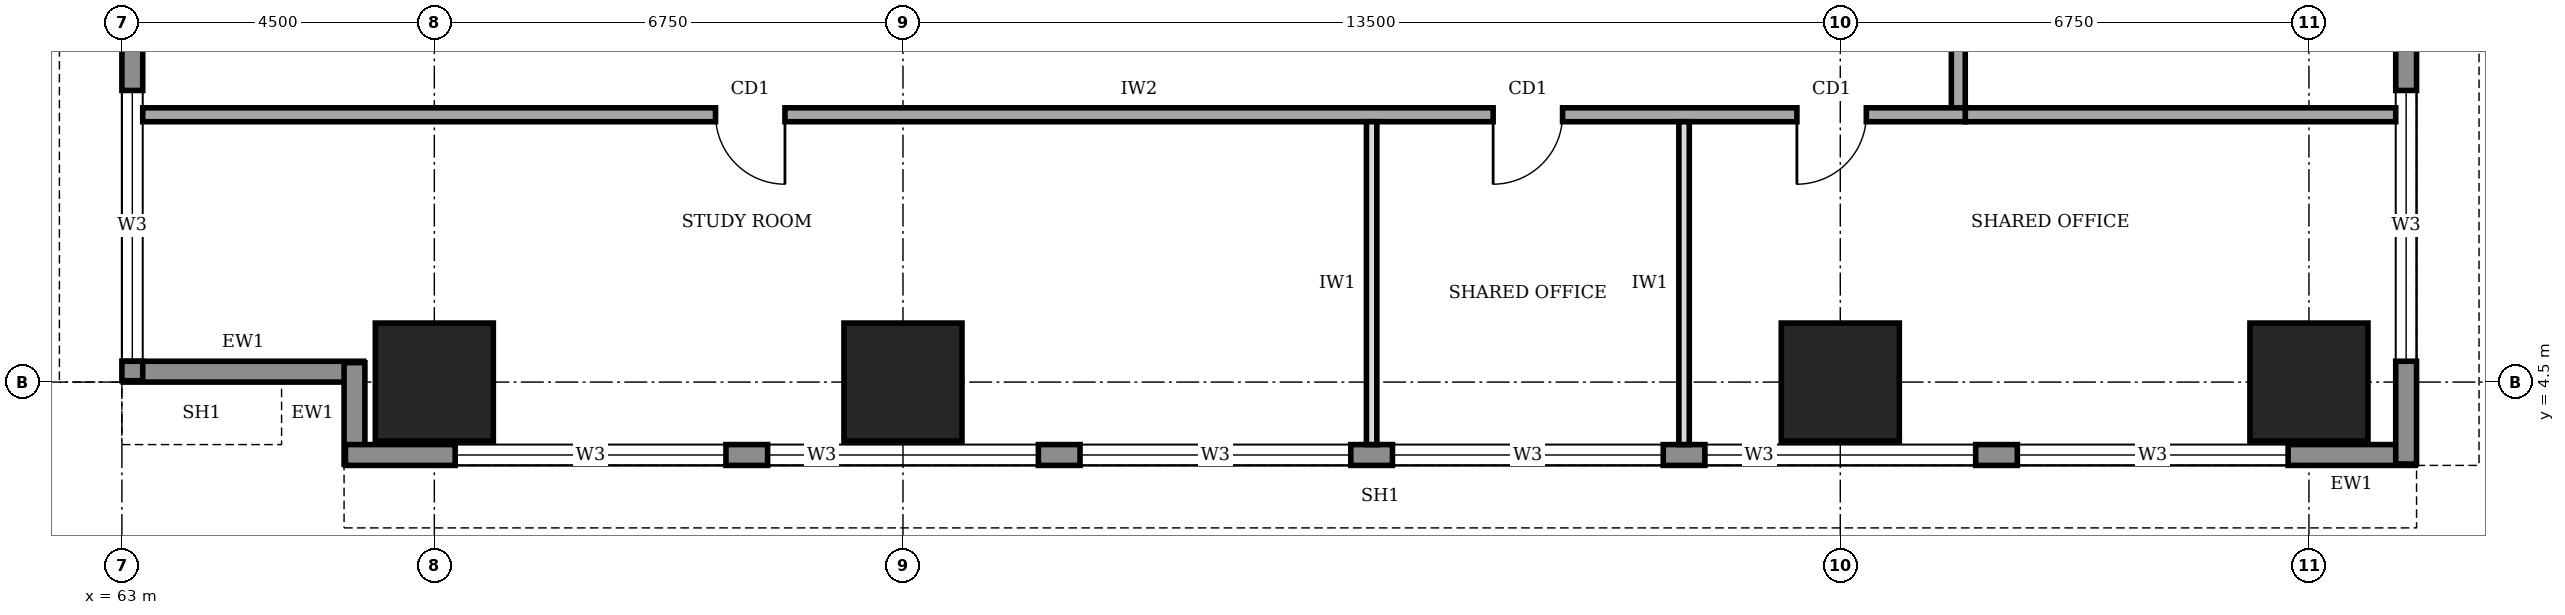
"""IFC4 building model, lengths in metres.
Left out: names, types, materials, properties, quantities, classifications, styles, units other than length and angle.
Written with IfcOpenShell. Run it as: python <this file> out.ifc"""

import sys

from ifc_helpers import new_model, si_unit, direction, frame, frame_2d, origin, origin_2d, place, context, subcontext, project, spatial, rectangle, extrude, element, fill, save


model = new_model("IFC4")
c1 = context("Model", 3, precision=1e-05, world=origin(), true_north=direction((0.0, 1.0)))
c2 = subcontext(c1, "Body", "Model", "MODEL_VIEW")
j1 = project(units=[si_unit("LENGTHUNIT", "METRE"), si_unit("PLANEANGLEUNIT", "RADIAN")], contexts=[c1])
p1 = place(None, origin())
s1 = spatial("IfcSite", under=j1, at=p1, CompositionType="ELEMENT")
p2 = place(p1, origin())
s2 = spatial("IfcBuilding", under=s1, at=p2, CompositionType="ELEMENT")
p3 = place(p2, frame((0.0, 0.0, 97.0)))
s3 = spatial("IfcBuildingStorey", under=s2, at=p3, CompositionType="ELEMENT", Elevation=97.0)
for number, where, z_axis, x_axis in (
    (1, (67.5, 4.5, 0.0), (0.0, 0.0, 1.0), (1.0, 0.0, 0.0)),
    (2, (74.25, 4.5, 0.0), (0.0, 0.0, 1.0), (1.0, 0.0, 0.0)),
    (3, (87.75, 4.5, 0.0), (0.0, 0.0, 1.0), (1.0, 0.0, 0.0)),
    (4, (94.5, 4.5, 0.0), (0.0, 0.0, 1.0), (1.0, 0.0, 0.0)),
):
    element("IfcColumn", number, at=place(p3, frame(where, z_axis=z_axis, x_axis=x_axis)), inside=s3, PredefinedType="COLUMN", context=c2, shape_type="SweptSolid", body=[
        extrude(rectangle(XDim=1.7, YDim=1.7, at=origin_2d()), origin(), (0.0, 0.0, 1.0), 4.0),
    ])
p4 = place(p3, frame((63.02, 4.65, 0.0), z_axis=(0.0, 0.0, 1.0), x_axis=(1.0, 0.0, 0.0)))
e5 = element("IfcWall", 5, at=p4, inside=s3, PredefinedType="STANDARD", context=c2, shape_type="SweptSolid", body=[
    extrude(rectangle(XDim=3.46, YDim=0.3, at=frame_2d((1.73, 0.0))), origin(), (0.0, 0.0, 1.0), 2.85),
])
p5 = place(p3, frame((66.35, 4.78, 0.0), z_axis=(0.0, 0.0, 1.0), x_axis=(0.0, -1.0, 0.0)))
e6 = element("IfcWall", 6, at=p5, inside=s3, PredefinedType="STANDARD", context=c2, shape_type="SweptSolid", body=[
    extrude(rectangle(XDim=1.46, YDim=0.3, at=frame_2d((0.73, 0.0))), origin(), (0.0, 0.0, 1.0), 3.75),
])
p6 = place(p3, frame((66.22, 3.45, 0.0), z_axis=(0.0, 0.0, 1.0), x_axis=(1.0, 0.0, 0.0)))
e7 = element("IfcWall", 7, at=p6, inside=s3, PredefinedType="STANDARD", context=c2, shape_type="SweptSolid", body=[
    extrude(rectangle(XDim=29.81, YDim=0.3, at=frame_2d((14.905, 0.0))), origin(), (0.0, 0.0, 1.0), 3.75),
])
p7 = place(p6, frame((1.58, 0.0, 0.95)))
e8 = element("IfcOpeningElement", 8, at=p7, cuts=e7, PredefinedType="OPENING", context=c2, shape_type="SweptSolid", body=[
    extrude(rectangle(XDim=3.9, YDim=1.8, at=frame_2d((1.95, 0.9))), frame((0.0, 0.16, 0.0), z_axis=(0.0, -1.0, 0.0), x_axis=(1.0, 0.0, 0.0)), (0.0, 0.0, 1.0), 0.32),
])
p8 = place(p6, frame((6.08, 0.0, 0.95)))
e9 = element("IfcOpeningElement", 9, at=p8, cuts=e7, PredefinedType="OPENING", context=c2, shape_type="SweptSolid", body=[
    extrude(rectangle(XDim=3.9, YDim=1.8, at=frame_2d((1.95, 0.9))), frame((0.0, 0.16, 0.0), z_axis=(0.0, -1.0, 0.0), x_axis=(1.0, 0.0, 0.0)), (0.0, 0.0, 1.0), 0.32),
])
p9 = place(p6, frame((10.58, 0.0, 0.95)))
e10 = element("IfcOpeningElement", 10, at=p9, cuts=e7, PredefinedType="OPENING", context=c2, shape_type="SweptSolid", body=[
    extrude(rectangle(XDim=3.9, YDim=1.8, at=frame_2d((1.95, 0.9))), frame((0.0, 0.16, 0.0), z_axis=(0.0, -1.0, 0.0), x_axis=(1.0, 0.0, 0.0)), (0.0, 0.0, 1.0), 0.32),
])
p10 = place(p6, frame((15.08, 0.0, 0.95)))
e11 = element("IfcOpeningElement", 11, at=p10, cuts=e7, PredefinedType="OPENING", context=c2, shape_type="SweptSolid", body=[
    extrude(rectangle(XDim=3.9, YDim=1.8, at=frame_2d((1.95, 0.9))), frame((0.0, 0.16, 0.0), z_axis=(0.0, -1.0, 0.0), x_axis=(1.0, 0.0, 0.0)), (0.0, 0.0, 1.0), 0.32),
])
p11 = place(p6, frame((19.58, 0.0, 0.95)))
e12 = element("IfcOpeningElement", 12, at=p11, cuts=e7, PredefinedType="OPENING", context=c2, shape_type="SweptSolid", body=[
    extrude(rectangle(XDim=3.9, YDim=1.8, at=frame_2d((1.95, 0.9))), frame((0.0, 0.16, 0.0), z_axis=(0.0, -1.0, 0.0), x_axis=(1.0, 0.0, 0.0)), (0.0, 0.0, 1.0), 0.32),
])
p12 = place(p6, frame((24.08, 0.0, 0.95)))
e13 = element("IfcOpeningElement", 13, at=p12, cuts=e7, PredefinedType="OPENING", context=c2, shape_type="SweptSolid", body=[
    extrude(rectangle(XDim=3.9, YDim=1.8, at=frame_2d((1.95, 0.9))), frame((0.0, 0.16, 0.0), z_axis=(0.0, -1.0, 0.0), x_axis=(1.0, 0.0, 0.0)), (0.0, 0.0, 1.0), 0.32),
])
p13 = place(p3, frame((95.9, 3.32, 0.0), z_axis=(0.0, 0.0, 1.0), x_axis=(0.0, 1.0, 0.0)))
e14 = element("IfcWall", 14, at=p13, inside=s3, PredefinedType="STANDARD", context=c2, shape_type="SweptSolid", body=[
    extrude(rectangle(XDim=33.96, YDim=0.3, at=frame_2d((16.98, 0.0))), origin(), (0.0, 0.0, 1.0), 3.75),
])
p14 = place(p13, frame((1.48, 0.0, 0.95)))
e15 = element("IfcOpeningElement", 15, at=p14, cuts=e14, PredefinedType="OPENING", context=c2, shape_type="SweptSolid", body=[
    extrude(rectangle(XDim=3.9, YDim=1.8, at=frame_2d((1.95, 0.9))), frame((0.0, 0.16, 0.0), z_axis=(0.0, -1.0, 0.0), x_axis=(1.0, 0.0, 0.0)), (0.0, 0.0, 1.0), 0.32),
])
p15 = place(p13, frame((5.98, 0.0, 0.95)))
e16 = element("IfcOpeningElement", 16, at=p15, cuts=e14, PredefinedType="OPENING", context=c2, shape_type="SweptSolid", body=[
    extrude(rectangle(XDim=3.9, YDim=1.8, at=frame_2d((1.95, 0.9))), frame((0.0, 0.16, 0.0), z_axis=(0.0, -1.0, 0.0), x_axis=(1.0, 0.0, 0.0)), (0.0, 0.0, 1.0), 0.32),
])
p16 = place(p13, frame((10.48, 0.0, 0.95)))
e17 = element("IfcOpeningElement", 17, at=p16, cuts=e14, PredefinedType="OPENING", context=c2, shape_type="SweptSolid", body=[
    extrude(rectangle(XDim=3.9, YDim=1.8, at=frame_2d((1.95, 0.9))), frame((0.0, 0.16, 0.0), z_axis=(0.0, -1.0, 0.0), x_axis=(1.0, 0.0, 0.0)), (0.0, 0.0, 1.0), 0.32),
])
p17 = place(p13, frame((14.98, 0.0, 0.95)))
e18 = element("IfcOpeningElement", 18, at=p17, cuts=e14, PredefinedType="OPENING", context=c2, shape_type="SweptSolid", body=[
    extrude(rectangle(XDim=3.9, YDim=1.8, at=frame_2d((1.95, 0.9))), frame((0.0, 0.16, 0.0), z_axis=(0.0, -1.0, 0.0), x_axis=(1.0, 0.0, 0.0)), (0.0, 0.0, 1.0), 0.32),
])
p18 = place(p13, frame((19.48, 0.0, 0.95)))
e19 = element("IfcOpeningElement", 19, at=p18, cuts=e14, PredefinedType="OPENING", context=c2, shape_type="SweptSolid", body=[
    extrude(rectangle(XDim=3.9, YDim=1.8, at=frame_2d((1.95, 0.9))), frame((0.0, 0.16, 0.0), z_axis=(0.0, -1.0, 0.0), x_axis=(1.0, 0.0, 0.0)), (0.0, 0.0, 1.0), 0.32),
])
p19 = place(p13, frame((23.98, 0.0, 0.95)))
e20 = element("IfcOpeningElement", 20, at=p19, cuts=e14, PredefinedType="OPENING", context=c2, shape_type="SweptSolid", body=[
    extrude(rectangle(XDim=3.9, YDim=1.8, at=frame_2d((1.95, 0.9))), frame((0.0, 0.16, 0.0), z_axis=(0.0, -1.0, 0.0), x_axis=(1.0, 0.0, 0.0)), (0.0, 0.0, 1.0), 0.32),
])
p20 = place(p13, frame((28.48, 0.0, 0.95)))
e21 = element("IfcOpeningElement", 21, at=p20, cuts=e14, PredefinedType="OPENING", context=c2, shape_type="SweptSolid", body=[
    extrude(rectangle(XDim=3.9, YDim=1.8, at=frame_2d((1.95, 0.9))), frame((0.0, 0.16, 0.0), z_axis=(0.0, -1.0, 0.0), x_axis=(1.0, 0.0, 0.0)), (0.0, 0.0, 1.0), 0.32),
])
p21 = place(p3, frame((63.15, 35.98, 0.0), z_axis=(0.0, 0.0, 1.0), x_axis=(0.0, -1.0, 0.0)))
e22 = element("IfcWall", 22, at=p21, inside=s3, PredefinedType="STANDARD", context=c2, shape_type="SweptSolid", body=[
    extrude(rectangle(XDim=31.46, YDim=0.3, at=frame_2d((15.73, 0.0))), origin(), (0.0, 0.0, 1.0), 3.75),
])
p22 = place(p21, frame((27.28, 0.0, 0.95)))
e23 = element("IfcOpeningElement", 23, at=p22, cuts=e22, PredefinedType="OPENING", context=c2, shape_type="SweptSolid", body=[
    extrude(rectangle(XDim=3.9, YDim=1.8, at=frame_2d((1.95, 0.9))), frame((0.0, 0.16, 0.0), z_axis=(0.0, -1.0, 0.0), x_axis=(1.0, 0.0, 0.0)), (0.0, 0.0, 1.0), 0.32),
])
p23 = place(p21, frame((22.78, 0.0, 0.95)))
e24 = element("IfcOpeningElement", 24, at=p23, cuts=e22, PredefinedType="OPENING", context=c2, shape_type="SweptSolid", body=[
    extrude(rectangle(XDim=3.9, YDim=1.8, at=frame_2d((1.95, 0.9))), frame((0.0, 0.16, 0.0), z_axis=(0.0, -1.0, 0.0), x_axis=(1.0, 0.0, 0.0)), (0.0, 0.0, 1.0), 0.32),
])
p24 = place(p21, frame((18.28, 0.0, 0.95)))
e25 = element("IfcOpeningElement", 25, at=p24, cuts=e22, PredefinedType="OPENING", context=c2, shape_type="SweptSolid", body=[
    extrude(rectangle(XDim=3.9, YDim=1.8, at=frame_2d((1.95, 0.9))), frame((0.0, 0.16, 0.0), z_axis=(0.0, -1.0, 0.0), x_axis=(1.0, 0.0, 0.0)), (0.0, 0.0, 1.0), 0.32),
])
p25 = place(p21, frame((13.78, 0.0, 0.95)))
e26 = element("IfcOpeningElement", 26, at=p25, cuts=e22, PredefinedType="OPENING", context=c2, shape_type="SweptSolid", body=[
    extrude(rectangle(XDim=3.9, YDim=1.8, at=frame_2d((1.95, 0.9))), frame((0.0, 0.16, 0.0), z_axis=(0.0, -1.0, 0.0), x_axis=(1.0, 0.0, 0.0)), (0.0, 0.0, 1.0), 0.32),
])
p26 = place(p21, frame((9.28, 0.0, 0.95)))
e27 = element("IfcOpeningElement", 27, at=p26, cuts=e22, PredefinedType="OPENING", context=c2, shape_type="SweptSolid", body=[
    extrude(rectangle(XDim=3.9, YDim=1.8, at=frame_2d((1.95, 0.9))), frame((0.0, 0.16, 0.0), z_axis=(0.0, -1.0, 0.0), x_axis=(1.0, 0.0, 0.0)), (0.0, 0.0, 1.0), 0.32),
])
p27 = place(p21, frame((4.78, 0.0, 0.95)))
e28 = element("IfcOpeningElement", 28, at=p27, cuts=e22, PredefinedType="OPENING", context=c2, shape_type="SweptSolid", body=[
    extrude(rectangle(XDim=3.9, YDim=1.8, at=frame_2d((1.95, 0.9))), frame((0.0, 0.16, 0.0), z_axis=(0.0, -1.0, 0.0), x_axis=(1.0, 0.0, 0.0)), (0.0, 0.0, 1.0), 0.32),
])
p28 = place(p3, frame((63.3, 8.35, 0.0), z_axis=(0.0, 0.0, 1.0), x_axis=(1.0, 0.0, 0.0)))
e29 = element("IfcWall", 29, at=p28, inside=s3, PredefinedType="SOLIDWALL", context=c2, shape_type="SweptSolid", body=[
    extrude(rectangle(XDim=26.25, YDim=0.2, at=frame_2d((13.125, 0.0))), origin(), (0.0, 0.0, 1.0), 3.75),
])
p29 = place(p28, frame((8.25, 0.0, 0.0)))
e30 = element("IfcOpeningElement", 30, at=p29, cuts=e29, PredefinedType="OPENING", context=c2, shape_type="SweptSolid", body=[
    extrude(rectangle(XDim=1.0, YDim=2.1, at=frame_2d((0.5, 1.05))), frame((0.0, 0.11, 0.0), z_axis=(0.0, -1.0, 0.0), x_axis=(1.0, 0.0, 0.0)), (0.0, 0.0, 1.0), 0.22),
])
p30 = place(p28, frame((19.45, 0.0, 0.0)))
e31 = element("IfcOpeningElement", 31, at=p30, cuts=e29, PredefinedType="OPENING", context=c2, shape_type="SweptSolid", body=[
    extrude(rectangle(XDim=1.0, YDim=2.1, at=frame_2d((0.5, 1.05))), frame((0.0, 0.11, 0.0), z_axis=(0.0, -1.0, 0.0), x_axis=(1.0, 0.0, 0.0)), (0.0, 0.0, 1.0), 0.22),
])
p31 = place(p28, frame((23.825, 0.0, 0.0)))
e32 = element("IfcOpeningElement", 32, at=p31, cuts=e29, PredefinedType="OPENING", context=c2, shape_type="SweptSolid", body=[
    extrude(rectangle(XDim=1.0, YDim=2.1, at=frame_2d((0.5, 1.05))), frame((0.0, 0.11, 0.0), z_axis=(0.0, -1.0, 0.0), x_axis=(1.0, 0.0, 0.0)), (0.0, 0.0, 1.0), 0.22),
])
p32 = place(p3, frame((89.45, 8.45, 0.0), z_axis=(0.0, 0.0, 1.0), x_axis=(0.0, 1.0, 0.0)))
e33 = element("IfcWall", 33, at=p32, inside=s3, PredefinedType="SOLIDWALL", context=c2, shape_type="SweptSolid", body=[
    extrude(rectangle(XDim=23.8, YDim=0.2, at=frame_2d((11.9, 0.0))), origin(), (0.0, 0.0, 1.0), 3.75),
])
p33 = place(p32, frame((1.925, 0.0, 0.0)))
e34 = element("IfcOpeningElement", 34, at=p33, cuts=e33, PredefinedType="OPENING", context=c2, shape_type="SweptSolid", body=[
    extrude(rectangle(XDim=1.0, YDim=2.1, at=frame_2d((0.5, 1.05))), frame((0.0, 0.11, 0.0), z_axis=(0.0, -1.0, 0.0), x_axis=(1.0, 0.0, 0.0)), (0.0, 0.0, 1.0), 0.22),
])
p34 = place(p32, frame((6.5, 0.0, 0.0)))
e35 = element("IfcOpeningElement", 35, at=p34, cuts=e33, PredefinedType="OPENING", context=c2, shape_type="SweptSolid", body=[
    extrude(rectangle(XDim=0.9, YDim=2.1, at=frame_2d((0.45, 1.05))), frame((0.0, 0.11, 0.0), z_axis=(0.0, -1.0, 0.0), x_axis=(1.0, 0.0, 0.0)), (0.0, 0.0, 1.0), 0.22),
])
p35 = place(p32, frame((9.5, 0.0, 0.0)))
e36 = element("IfcOpeningElement", 36, at=p35, cuts=e33, PredefinedType="OPENING", context=c2, shape_type="SweptSolid", body=[
    extrude(rectangle(XDim=0.9, YDim=2.1, at=frame_2d((0.45, 1.05))), frame((0.0, 0.11, 0.0), z_axis=(0.0, -1.0, 0.0), x_axis=(1.0, 0.0, 0.0)), (0.0, 0.0, 1.0), 0.22),
])
p36 = place(p32, frame((14.35, 0.0, 0.0)))
e37 = element("IfcOpeningElement", 37, at=p36, cuts=e33, PredefinedType="OPENING", context=c2, shape_type="SweptSolid", body=[
    extrude(rectangle(XDim=0.9, YDim=2.1, at=frame_2d((0.45, 1.05))), frame((0.0, 0.11, 0.0), z_axis=(0.0, -1.0, 0.0), x_axis=(1.0, 0.0, 0.0)), (0.0, 0.0, 1.0), 0.22),
])
p37 = place(p32, frame((17.05, 0.0, 0.0)))
e38 = element("IfcOpeningElement", 38, at=p37, cuts=e33, PredefinedType="OPENING", context=c2, shape_type="SweptSolid", body=[
    extrude(rectangle(XDim=1.0, YDim=2.1, at=frame_2d((0.5, 1.05))), frame((0.0, 0.11, 0.0), z_axis=(0.0, -1.0, 0.0), x_axis=(1.0, 0.0, 0.0)), (0.0, 0.0, 1.0), 0.22),
])
p38 = place(p32, frame((11.55, 0.0, 0.0)))
e39 = element("IfcOpeningElement", 39, at=p38, cuts=e33, PredefinedType="OPENING", context=c2, shape_type="SweptSolid", body=[
    extrude(rectangle(XDim=1.0, YDim=2.1, at=frame_2d((0.5, 1.05))), frame((0.0, 0.11, 0.0), z_axis=(0.0, -1.0, 0.0), x_axis=(1.0, 0.0, 0.0)), (0.0, 0.0, 1.0), 0.22),
])
p39 = place(p32, frame((20.675, 0.0, 0.0)))
e40 = element("IfcOpeningElement", 40, at=p39, cuts=e33, PredefinedType="OPENING", context=c2, shape_type="SweptSolid", body=[
    extrude(rectangle(XDim=1.0, YDim=2.1, at=frame_2d((0.5, 1.05))), frame((0.0, 0.11, 0.0), z_axis=(0.0, -1.0, 0.0), x_axis=(1.0, 0.0, 0.0)), (0.0, 0.0, 1.0), 0.22),
])
p40 = place(p3, frame((89.55, 8.35, 0.0), z_axis=(0.0, 0.0, 1.0), x_axis=(1.0, 0.0, 0.0)))
e41 = element("IfcWall", 41, at=p40, inside=s3, PredefinedType="SOLIDWALL", context=c2, shape_type="SweptSolid", body=[
    extrude(rectangle(XDim=6.2, YDim=0.2, at=frame_2d((3.1, 0.0))), origin(), (0.0, 0.0, 1.0), 3.75),
])
for number, where, z_axis, x_axis in (
    (42, (81.0, 3.6, 0.0), (0.0, 0.0, 1.0), (0.0, 1.0, 0.0)),
    (43, (85.5, 3.6, 0.0), (0.0, 0.0, 1.0), (0.0, 1.0, 0.0)),
):
    element("IfcWall", number, at=place(p3, frame(where, z_axis=z_axis, x_axis=x_axis)), inside=s3, PredefinedType="PARTITIONING", context=c2, shape_type="SweptSolid", body=[
        extrude(rectangle(XDim=4.65, YDim=0.15, at=frame_2d((2.325, 0.0))), origin(), (0.0, 0.0, 1.0), 3.75),
    ])
p41 = place(p7, origin())
e44 = element("IfcWindow", 44, at=p41, inside=s3, PartitioningType="SINGLE_PANEL", PredefinedType="WINDOW", context=c2, shape_type="SweptSolid", body=[
    extrude(rectangle(XDim=3.9, YDim=1.8, at=frame_2d((1.95, 0.9))), frame((0.0, 0.03, 0.0), z_axis=(0.0, -1.0, 0.0), x_axis=(1.0, 0.0, 0.0)), (0.0, 0.0, 1.0), 0.06),
])
fill(e8, e44)
p42 = place(p8, origin())
e45 = element("IfcWindow", 45, at=p42, inside=s3, PartitioningType="SINGLE_PANEL", PredefinedType="WINDOW", context=c2, shape_type="SweptSolid", body=[
    extrude(rectangle(XDim=3.9, YDim=1.8, at=frame_2d((1.95, 0.9))), frame((0.0, 0.03, 0.0), z_axis=(0.0, -1.0, 0.0), x_axis=(1.0, 0.0, 0.0)), (0.0, 0.0, 1.0), 0.06),
])
fill(e9, e45)
p43 = place(p9, origin())
e46 = element("IfcWindow", 46, at=p43, inside=s3, PartitioningType="SINGLE_PANEL", PredefinedType="WINDOW", context=c2, shape_type="SweptSolid", body=[
    extrude(rectangle(XDim=3.9, YDim=1.8, at=frame_2d((1.95, 0.9))), frame((0.0, 0.03, 0.0), z_axis=(0.0, -1.0, 0.0), x_axis=(1.0, 0.0, 0.0)), (0.0, 0.0, 1.0), 0.06),
])
fill(e10, e46)
p44 = place(p10, origin())
e47 = element("IfcWindow", 47, at=p44, inside=s3, PartitioningType="SINGLE_PANEL", PredefinedType="WINDOW", context=c2, shape_type="SweptSolid", body=[
    extrude(rectangle(XDim=3.9, YDim=1.8, at=frame_2d((1.95, 0.9))), frame((0.0, 0.03, 0.0), z_axis=(0.0, -1.0, 0.0), x_axis=(1.0, 0.0, 0.0)), (0.0, 0.0, 1.0), 0.06),
])
fill(e11, e47)
p45 = place(p11, origin())
e48 = element("IfcWindow", 48, at=p45, inside=s3, PartitioningType="SINGLE_PANEL", PredefinedType="WINDOW", context=c2, shape_type="SweptSolid", body=[
    extrude(rectangle(XDim=3.9, YDim=1.8, at=frame_2d((1.95, 0.9))), frame((0.0, 0.03, 0.0), z_axis=(0.0, -1.0, 0.0), x_axis=(1.0, 0.0, 0.0)), (0.0, 0.0, 1.0), 0.06),
])
fill(e12, e48)
p46 = place(p12, origin())
e49 = element("IfcWindow", 49, at=p46, inside=s3, PartitioningType="SINGLE_PANEL", PredefinedType="WINDOW", context=c2, shape_type="SweptSolid", body=[
    extrude(rectangle(XDim=3.9, YDim=1.8, at=frame_2d((1.95, 0.9))), frame((0.0, 0.03, 0.0), z_axis=(0.0, -1.0, 0.0), x_axis=(1.0, 0.0, 0.0)), (0.0, 0.0, 1.0), 0.06),
])
fill(e13, e49)
p47 = place(p14, origin())
e50 = element("IfcWindow", 50, at=p47, inside=s3, PartitioningType="SINGLE_PANEL", PredefinedType="WINDOW", context=c2, shape_type="SweptSolid", body=[
    extrude(rectangle(XDim=3.9, YDim=1.8, at=frame_2d((1.95, 0.9))), frame((0.0, 0.03, 0.0), z_axis=(0.0, -1.0, 0.0), x_axis=(1.0, 0.0, 0.0)), (0.0, 0.0, 1.0), 0.06),
])
fill(e15, e50)
p48 = place(p22, origin())
e51 = element("IfcWindow", 51, at=p48, inside=s3, PartitioningType="SINGLE_PANEL", PredefinedType="WINDOW", context=c2, shape_type="SweptSolid", body=[
    extrude(rectangle(XDim=3.9, YDim=1.8, at=frame_2d((1.95, 0.9))), frame((0.0, 0.03, 0.0), z_axis=(0.0, -1.0, 0.0), x_axis=(1.0, 0.0, 0.0)), (0.0, 0.0, 1.0), 0.06),
])
fill(e23, e51)
p49 = place(p29, frame((1.0, 0.0, 0.0), z_axis=(0.0, 0.0, 1.0), x_axis=(-1.0, 0.0, 0.0)))
e52 = element("IfcDoor", 52, at=p49, inside=s3, OperationType="SINGLE_SWING_LEFT", PredefinedType="DOOR", context=c2, shape_type="SweptSolid", body=[
    extrude(rectangle(XDim=1.0, YDim=2.1, at=frame_2d((0.5, 1.05))), frame((0.0, 0.025, 0.0), z_axis=(0.0, -1.0, 0.0), x_axis=(1.0, 0.0, 0.0)), (0.0, 0.0, 1.0), 0.05),
])
fill(e30, e52)
p50 = place(p30, frame((1.0, 0.0, 0.0), z_axis=(0.0, 0.0, 1.0), x_axis=(-1.0, 0.0, 0.0)))
e53 = element("IfcDoor", 53, at=p50, inside=s3, OperationType="SINGLE_SWING_RIGHT", PredefinedType="DOOR", context=c2, shape_type="SweptSolid", body=[
    extrude(rectangle(XDim=1.0, YDim=2.1, at=frame_2d((0.5, 1.05))), frame((0.0, 0.025, 0.0), z_axis=(0.0, -1.0, 0.0), x_axis=(1.0, 0.0, 0.0)), (0.0, 0.0, 1.0), 0.05),
])
fill(e31, e53)
p51 = place(p31, frame((1.0, 0.0, 0.0), z_axis=(0.0, 0.0, 1.0), x_axis=(-1.0, 0.0, 0.0)))
e54 = element("IfcDoor", 54, at=p51, inside=s3, OperationType="SINGLE_SWING_RIGHT", PredefinedType="DOOR", context=c2, shape_type="SweptSolid", body=[
    extrude(rectangle(XDim=1.0, YDim=2.1, at=frame_2d((0.5, 1.05))), frame((0.0, 0.025, 0.0), z_axis=(0.0, -1.0, 0.0), x_axis=(1.0, 0.0, 0.0)), (0.0, 0.0, 1.0), 0.05),
])
fill(e32, e54)
save(model, sys.argv[1])
